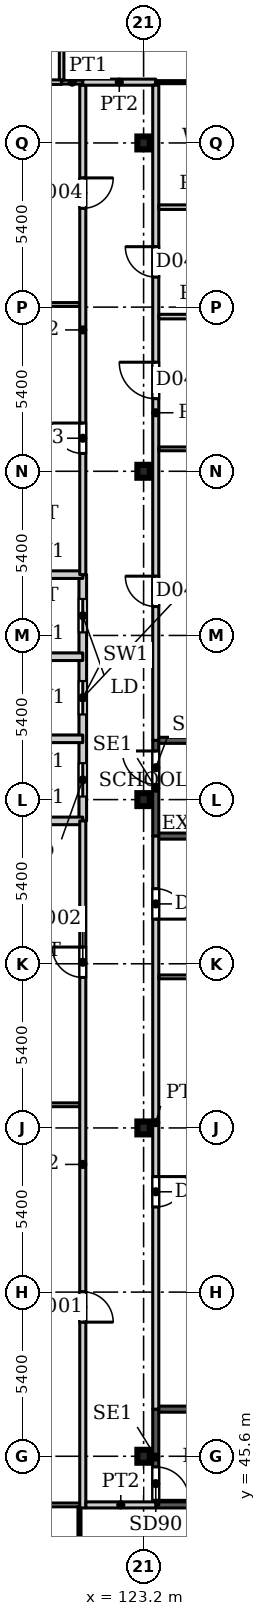
"""IFC4 building model, lengths in metres.
Left out: names, types, materials, properties, quantities, classifications, styles, units other than length and angle.
Written with IfcOpenShell. Run it as: python <this file> out.ifc"""

import sys

from ifc_helpers import new_model, si_unit, direction, frame, frame_2d, origin, origin_2d, place, context, subcontext, project, spatial, rectangle, i_section, extrude, source, transform, mapped, element, fill, save


model = new_model("IFC4")
c1 = context("Model", 3, precision=1e-05, world=origin(), true_north=direction((0.0, 1.0)))
c2 = subcontext(c1, "Body", "Model", "MODEL_VIEW")
j1 = project(units=[si_unit("LENGTHUNIT", "METRE"), si_unit("PLANEANGLEUNIT", "RADIAN")], contexts=[c1])
p1 = place(None, origin())
s1 = spatial("IfcSite", under=j1, at=p1, CompositionType="ELEMENT")
p2 = place(p1, origin())
s2 = spatial("IfcBuilding", under=s1, at=p2, CompositionType="ELEMENT")
p3 = place(p2, frame((0.0, 0.0, 21.5)))
s3 = spatial("IfcBuildingStorey", under=s2, at=p3, CompositionType="ELEMENT", Elevation=21.5)
for number, where, z_axis, x_axis in (
    (1, (123.2, 45.6, 0.0), (0.0, 0.0, 1.0), (1.0, 0.0, 0.0)),
    (2, (123.2, 56.4, 0.0), (0.0, 0.0, 1.0), (1.0, 0.0, 0.0)),
    (3, (123.2, 67.2, 0.0), (0.0, 0.0, 1.0), (1.0, 0.0, 0.0)),
    (4, (123.2, 78.0, 0.0), (0.0, 0.0, 1.0), (1.0, 0.0, 0.0)),
    (5, (123.2, 88.8, 0.0), (0.0, 0.0, 1.0), (1.0, 0.0, 0.0)),
):
    element("IfcColumn", number, at=place(p3, frame(where, z_axis=z_axis, x_axis=x_axis)), inside=s3, PredefinedType="COLUMN", context=c2, shape_type="SweptSolid", body=[
        extrude(i_section(OverallWidth=0.409, OverallDepth=0.425, WebThickness=0.033, FlangeThickness=0.052, FilletRadius=0.013, at=origin_2d()), origin(), (0.0, 0.0, 1.0), 4.5),
    ])
p4 = place(p3, frame((121.2, 66.5, 0.0), z_axis=(0.0, 0.0, 1.0), x_axis=(0.0, 1.0, 0.0)))
e6 = element("IfcWall", 6, at=p4, inside=s3, PredefinedType="PARTITIONING", context=c2, shape_type="SweptSolid", body=[
    extrude(rectangle(XDim=8.1, YDim=0.25, at=frame_2d((4.05, 0.0))), origin(), (0.0, 0.0, 1.0), 4.5),
])
p5 = place(p4, frame((0.8, 0.0, 0.0)))
e7 = element("IfcOpeningElement", 7, at=p5, cuts=e6, PredefinedType="OPENING", context=c2, shape_type="SweptSolid", body=[
    extrude(rectangle(XDim=1.1, YDim=2.2, at=frame_2d((0.55, 1.1))), frame((0.0, 0.135, 0.0), z_axis=(0.0, -1.0, 0.0), x_axis=(1.0, 0.0, 0.0)), (0.0, 0.0, 1.0), 0.27),
])
p6 = place(p4, frame((3.5, 0.0, 0.0)))
e8 = element("IfcOpeningElement", 8, at=p6, cuts=e6, PredefinedType="OPENING", context=c2, shape_type="SweptSolid", body=[
    extrude(rectangle(XDim=1.1, YDim=2.2, at=frame_2d((0.55, 1.1))), frame((0.0, 0.135, 0.0), z_axis=(0.0, -1.0, 0.0), x_axis=(1.0, 0.0, 0.0)), (0.0, 0.0, 1.0), 0.27),
])
p7 = place(p4, frame((6.2, 0.0, 0.0)))
e9 = element("IfcOpeningElement", 9, at=p7, cuts=e6, PredefinedType="OPENING", context=c2, shape_type="SweptSolid", body=[
    extrude(rectangle(XDim=1.1, YDim=2.2, at=frame_2d((0.55, 1.1))), frame((0.0, 0.135, 0.0), z_axis=(0.0, -1.0, 0.0), x_axis=(1.0, 0.0, 0.0)), (0.0, 0.0, 1.0), 0.27),
])
for number, where, z_axis, x_axis in (
    (10, (118.5, 66.5, 0.0), (0.0, 0.0, 1.0), (1.0, 0.0, 0.0)),
    (11, (118.5, 69.2, 0.0), (0.0, 0.0, 1.0), (1.0, 0.0, 0.0)),
    (12, (118.5, 71.9, 0.0), (0.0, 0.0, 1.0), (1.0, 0.0, 0.0)),
    (13, (118.5, 74.6, 0.0), (0.0, 0.0, 1.0), (1.0, 0.0, 0.0)),
):
    element("IfcWall", number, at=place(p3, frame(where, z_axis=z_axis, x_axis=x_axis)), inside=s3, PredefinedType="PARTITIONING", context=c2, shape_type="SweptSolid", body=[
        extrude(rectangle(XDim=2.7, YDim=0.25, at=frame_2d((1.35, 0.0))), origin(), (0.0, 0.0, 1.0), 4.5),
    ])
p8 = place(p3, frame((123.6, 44.0, 0.0), z_axis=(0.0, 0.0, 1.0), x_axis=(1.0, 0.0, 0.0)))
e14 = element("IfcWall", 14, at=p8, inside=s3, PredefinedType="SHEAR", context=c2, shape_type="SweptSolid", body=[
    extrude(rectangle(XDim=7.2, YDim=0.2, at=frame_2d((3.6, 0.0))), origin(), (0.0, 0.0, 1.0), 4.5),
])
p9 = place(p3, frame((123.6, 47.15, 0.0), z_axis=(0.0, 0.0, 1.0), x_axis=(1.0, 0.0, 0.0)))
e15 = element("IfcWall", 15, at=p9, inside=s3, PredefinedType="SHEAR", context=c2, shape_type="SweptSolid", body=[
    extrude(rectangle(XDim=8.4, YDim=0.2, at=frame_2d((4.2, 0.0))), origin(), (0.0, 0.0, 1.0), 4.5),
])
p10 = place(p3, frame((123.6, 44.0, 0.0), z_axis=(0.0, 0.0, 1.0), x_axis=(0.0, 1.0, 0.0)))
e16 = element("IfcWall", 16, at=p10, inside=s3, PredefinedType="SHEAR", context=c2, shape_type="SweptSolid", body=[
    extrude(rectangle(XDim=3.15, YDim=0.2, at=frame_2d((1.575, 0.0))), origin(), (0.0, 0.0, 1.0), 4.5),
])
p11 = place(p10, frame((0.15, 0.0, 0.0)))
e17 = element("IfcOpeningElement", 17, at=p11, cuts=e16, PredefinedType="OPENING", context=c2, shape_type="SweptSolid", body=[
    extrude(rectangle(XDim=1.1, YDim=2.2, at=frame_2d((0.55, 1.1))), frame((0.0, 0.11, 0.0), z_axis=(0.0, -1.0, 0.0), x_axis=(1.0, 0.0, 0.0)), (0.0, 0.0, 1.0), 0.22),
])
p12 = place(p3, frame((123.6, 66.0, 0.0), z_axis=(0.0, 0.0, 1.0), x_axis=(1.0, 0.0, 0.0)))
e18 = element("IfcWall", 18, at=p12, inside=s3, PredefinedType="SHEAR", context=c2, shape_type="SweptSolid", body=[
    extrude(rectangle(XDim=7.2, YDim=0.2, at=frame_2d((3.6, 0.0))), origin(), (0.0, 0.0, 1.0), 4.5),
])
p13 = place(p3, frame((123.6, 69.15, 0.0), z_axis=(0.0, 0.0, 1.0), x_axis=(1.0, 0.0, 0.0)))
e19 = element("IfcWall", 19, at=p13, inside=s3, PredefinedType="SHEAR", context=c2, shape_type="SweptSolid", body=[
    extrude(rectangle(XDim=8.4, YDim=0.2, at=frame_2d((4.2, 0.0))), origin(), (0.0, 0.0, 1.0), 4.5),
])
p14 = place(p3, frame((123.6, 66.0, 0.0), z_axis=(0.0, 0.0, 1.0), x_axis=(0.0, 1.0, 0.0)))
e20 = element("IfcWall", 20, at=p14, inside=s3, PredefinedType="SHEAR", context=c2, shape_type="SweptSolid", body=[
    extrude(rectangle(XDim=3.15, YDim=0.2, at=frame_2d((1.575, 0.0))), origin(), (0.0, 0.0, 1.0), 4.5),
])
p15 = place(p14, frame((1.7, 0.0, 0.0)))
e21 = element("IfcOpeningElement", 21, at=p15, cuts=e20, PredefinedType="OPENING", context=c2, shape_type="SweptSolid", body=[
    extrude(rectangle(XDim=1.1, YDim=2.2, at=frame_2d((0.55, 1.1))), frame((0.0, 0.11, 0.0), z_axis=(0.0, -1.0, 0.0), x_axis=(1.0, 0.0, 0.0)), (0.0, 0.0, 1.0), 0.22),
])
p16 = place(p3, frame((110.183, 90.8, 0.0), z_axis=(0.0, 0.0, 1.0), x_axis=(1.0, 0.0, 0.0)))
e22 = element("IfcWall", 22, at=p16, inside=s3, PredefinedType="PARTITIONING", context=c2, shape_type="SweptSolid", body=[
    extrude(rectangle(XDim=10.321, YDim=0.15, at=frame_2d((5.16, 0.0))), origin(), (0.0, 0.0, 1.0), 4.18),
])
p17 = place(p3, frame((112.862, 44.0, 0.0), z_axis=(0.0, 0.0, 1.0), x_axis=(1.0, 0.0, 0.0)))
e23 = element("IfcWall", 23, at=p17, inside=s3, PredefinedType="PARTITIONING", context=c2, shape_type="SweptSolid", body=[
    extrude(rectangle(XDim=8.279, YDim=0.125, at=frame_2d((4.14, 0.0))), origin(), (0.0, 0.0, 1.0), 4.18),
])
for number, where, z_axis, x_axis in (
    (24, (112.862, 57.162, 0.0), (0.0, 0.0, 1.0), (1.0, 0.0, 0.0)),
    (25, (112.862, 83.487, 0.0), (0.0, 0.0, 1.0), (1.0, 0.0, 0.0)),
):
    element("IfcWall", number, at=place(p3, frame(where, z_axis=z_axis, x_axis=x_axis)), inside=s3, PredefinedType="PARTITIONING", context=c2, shape_type="SweptSolid", body=[
        extrude(rectangle(XDim=8.238, YDim=0.125, at=frame_2d((4.119, 0.0))), origin(), (0.0, 0.0, 1.0), 4.18),
    ])
p18 = place(p3, frame((120.504, 90.8, 0.0), z_axis=(0.0, 0.0, 1.0), x_axis=(1.0, 0.0, 0.0)))
e26 = element("IfcWall", 26, at=p18, inside=s3, PredefinedType="PARTITIONING", context=c2, shape_type="SweptSolid", body=[
    extrude(rectangle(XDim=0.696, YDim=0.125, at=frame_2d((0.348, 0.0))), origin(), (0.0, 0.0, 1.0), 4.18),
])
p19 = place(p3, frame((120.504, 90.875, 0.0), z_axis=(0.0, 0.0, 1.0), x_axis=(0.0, 1.0, 0.0)))
e27 = element("IfcWall", 27, at=p19, inside=s3, PredefinedType="PARTITIONING", context=c2, shape_type="SweptSolid", body=[
    extrude(rectangle(XDim=8.225, YDim=0.15, at=frame_2d((4.113, 0.0))), origin(), (0.0, 0.0, 1.0), 4.18),
])
p20 = place(p3, frame((121.091, 35.3, 0.0), z_axis=(0.0, 0.0, 1.0), x_axis=(0.0, 1.0, 0.0)))
e28 = element("IfcWall", 28, at=p20, inside=s3, PredefinedType="PARTITIONING", context=c2, shape_type="SweptSolid", body=[
    extrude(rectangle(XDim=8.638, YDim=0.1, at=frame_2d((4.319, 0.0))), origin(), (0.0, 0.0, 1.0), 4.18),
])
p21 = place(p3, frame((121.2, 43.9, 0.0), z_axis=(0.0, 0.0, 1.0), x_axis=(0.0, 1.0, 0.0)))
e29 = element("IfcWall", 29, at=p21, inside=s3, PredefinedType="PARTITIONING", context=c2, shape_type="SweptSolid", body=[
    extrude(rectangle(XDim=22.6, YDim=0.2, at=frame_2d((11.3, 0.0))), origin(), (0.0, 0.0, 1.0), 4.18),
])
p22 = place(p21, frame((6.112, 0.0, 0.0)))
e30 = element("IfcOpeningElement", 30, at=p22, cuts=e29, PredefinedType="OPENING", context=c2, shape_type="SweptSolid", body=[
    extrude(rectangle(XDim=1.0, YDim=2.1, at=frame_2d((0.5, 1.05))), frame((0.0, 0.11, 0.0), z_axis=(0.0, -1.0, 0.0), x_axis=(1.0, 0.0, 0.0)), (0.0, 0.0, 1.0), 0.22),
])
p23 = place(p21, frame((17.45, 0.0, 0.0)))
e31 = element("IfcOpeningElement", 31, at=p23, cuts=e29, PredefinedType="OPENING", context=c2, shape_type="SweptSolid", body=[
    extrude(rectangle(XDim=1.0, YDim=2.1, at=frame_2d((0.5, 1.05))), frame((0.0, 0.11, 0.0), z_axis=(0.0, -1.0, 0.0), x_axis=(1.0, 0.0, 0.0)), (0.0, 0.0, 1.0), 0.22),
])
p24 = place(p3, frame((121.2, 74.6, 0.0), z_axis=(0.0, 0.0, 1.0), x_axis=(0.0, 1.0, 0.0)))
e32 = element("IfcWall", 32, at=p24, inside=s3, PredefinedType="PARTITIONING", context=c2, shape_type="SweptSolid", body=[
    extrude(rectangle(XDim=16.1, YDim=0.2, at=frame_2d((8.05, 0.0))), origin(), (0.0, 0.0, 1.0), 4.18),
])
p25 = place(p24, frame((3.987, 0.0, 0.0)))
e33 = element("IfcOpeningElement", 33, at=p25, cuts=e32, PredefinedType="OPENING", context=c2, shape_type="SweptSolid", body=[
    extrude(rectangle(XDim=1.0, YDim=2.1, at=frame_2d((0.5, 1.05))), frame((0.0, 0.11, 0.0), z_axis=(0.0, -1.0, 0.0), x_axis=(1.0, 0.0, 0.0)), (0.0, 0.0, 1.0), 0.22),
])
p26 = place(p24, frame((12.05, 0.0, 0.0)))
e34 = element("IfcOpeningElement", 34, at=p26, cuts=e32, PredefinedType="OPENING", context=c2, shape_type="SweptSolid", body=[
    extrude(rectangle(XDim=1.0, YDim=2.1, at=frame_2d((0.5, 1.05))), frame((0.0, 0.11, 0.0), z_axis=(0.0, -1.0, 0.0), x_axis=(1.0, 0.0, 0.0)), (0.0, 0.0, 1.0), 0.22),
])
p27 = place(p3, frame((121.2, 90.8, 0.0), z_axis=(0.0, 0.0, 1.0), x_axis=(1.0, 0.0, 0.0)))
e35 = element("IfcWall", 35, at=p27, inside=s3, PredefinedType="PARTITIONING", context=c2, shape_type="SweptSolid", body=[
    extrude(rectangle(XDim=2.4, YDim=0.2, at=frame_2d((1.2, 0.0))), origin(), (0.0, 0.0, 1.0), 4.18),
])
p28 = place(p3, frame((121.3, 44.0, 0.0), z_axis=(0.0, 0.0, 1.0), x_axis=(1.0, 0.0, 0.0)))
e36 = element("IfcWall", 36, at=p28, inside=s3, PredefinedType="PARTITIONING", context=c2, shape_type="SweptSolid", body=[
    extrude(rectangle(XDim=2.3, YDim=0.2, at=frame_2d((1.15, 0.0))), origin(), (0.0, 0.0, 1.0), 4.18),
])
p29 = place(p3, frame((123.6, 47.15, 0.0), z_axis=(0.0, 0.0, 1.0), x_axis=(0.0, 1.0, 0.0)))
e37 = element("IfcWall", 37, at=p29, inside=s3, PredefinedType="PARTITIONING", context=c2, shape_type="SweptSolid", body=[
    extrude(rectangle(XDim=18.85, YDim=0.2, at=frame_2d((9.425, 0.0))), origin(), (0.0, 0.0, 1.0), 4.18),
])
p30 = place(p29, frame((6.65, 0.0, 0.0)))
e38 = element("IfcOpeningElement", 38, at=p30, cuts=e37, PredefinedType="OPENING", context=c2, shape_type="SweptSolid", body=[
    extrude(rectangle(XDim=1.0, YDim=2.1, at=frame_2d((0.5, 1.05))), frame((0.0, 0.11, 0.0), z_axis=(0.0, -1.0, 0.0), x_axis=(1.0, 0.0, 0.0)), (0.0, 0.0, 1.0), 0.22),
])
p31 = place(p29, frame((16.119, 0.0, 0.0)))
e39 = element("IfcOpeningElement", 39, at=p31, cuts=e37, PredefinedType="OPENING", context=c2, shape_type="SweptSolid", body=[
    extrude(rectangle(XDim=1.0, YDim=2.1, at=frame_2d((0.5, 1.05))), frame((0.0, 0.11, 0.0), z_axis=(0.0, -1.0, 0.0), x_axis=(1.0, 0.0, 0.0)), (0.0, 0.0, 1.0), 0.22),
])
p32 = place(p3, frame((123.6, 69.15, 0.0), z_axis=(0.0, 0.0, 1.0), x_axis=(0.0, 1.0, 0.0)))
e40 = element("IfcWall", 40, at=p32, inside=s3, PredefinedType="PARTITIONING", context=c2, shape_type="SweptSolid", body=[
    extrude(rectangle(XDim=21.55, YDim=0.2, at=frame_2d((10.775, 0.0))), origin(), (0.0, 0.0, 1.0), 4.18),
])
p33 = place(p32, frame((4.4, 0.0, 0.0)))
e41 = element("IfcOpeningElement", 41, at=p33, cuts=e40, PredefinedType="OPENING", context=c2, shape_type="SweptSolid", body=[
    extrude(rectangle(XDim=1.0, YDim=2.1, at=frame_2d((0.5, 1.05))), frame((0.0, 0.11, 0.0), z_axis=(0.0, -1.0, 0.0), x_axis=(1.0, 0.0, 0.0)), (0.0, 0.0, 1.0), 0.22),
])
p34 = place(p32, frame((15.238, 0.0, 0.0)))
e42 = element("IfcOpeningElement", 42, at=p34, cuts=e40, PredefinedType="OPENING", context=c2, shape_type="SweptSolid", body=[
    extrude(rectangle(XDim=1.0, YDim=2.1, at=frame_2d((0.5, 1.05))), frame((0.0, 0.11, 0.0), z_axis=(0.0, -1.0, 0.0), x_axis=(1.0, 0.0, 0.0)), (0.0, 0.0, 1.0), 0.22),
])
p35 = place(p32, frame((11.238, 0.0, 0.0)))
e43 = element("IfcOpeningElement", 43, at=p35, cuts=e40, PredefinedType="OPENING", context=c2, shape_type="SweptSolid", body=[
    extrude(rectangle(XDim=1.2, YDim=2.1, at=frame_2d((0.6, 1.05))), frame((0.0, 0.11, 0.0), z_axis=(0.0, -1.0, 0.0), x_axis=(1.0, 0.0, 0.0)), (0.0, 0.0, 1.0), 0.22),
])
p36 = place(p3, frame((123.6, 90.8, 0.0), z_axis=(0.0, 0.0, 1.0), x_axis=(1.0, 0.0, 0.0)))
e44 = element("IfcWall", 44, at=p36, inside=s3, PredefinedType="PARTITIONING", context=c2, shape_type="SweptSolid", body=[
    extrude(rectangle(XDim=8.4, YDim=0.1, at=frame_2d((4.2, 0.0))), origin(), (0.0, 0.0, 1.0), 4.18),
])
for number, where, z_axis, x_axis in (
    (45, (123.7, 61.369, 0.0), (0.0, 0.0, 1.0), (1.0, 0.0, 0.0)),
    (46, (123.7, 78.738, 0.0), (0.0, 0.0, 1.0), (1.0, 0.0, 0.0)),
):
    element("IfcWall", number, at=place(p3, frame(where, z_axis=z_axis, x_axis=x_axis)), inside=s3, PredefinedType="PARTITIONING", context=c2, shape_type="SweptSolid", body=[
        extrude(rectangle(XDim=8.3, YDim=0.125, at=frame_2d((4.15, 0.0))), origin(), (0.0, 0.0, 1.0), 4.18),
    ])
for number, where, z_axis, x_axis in (
    (47, (123.7, 83.088, 0.0), (0.0, 0.0, 1.0), (1.0, 0.0, 0.0)),
    (48, (123.7, 86.688, 0.0), (0.0, 0.0, 1.0), (1.0, 0.0, 0.0)),
):
    element("IfcWall", number, at=place(p3, frame(where, z_axis=z_axis, x_axis=x_axis)), inside=s3, PredefinedType="PARTITIONING", context=c2, shape_type="SweptSolid", body=[
        extrude(rectangle(XDim=3.025, YDim=0.15, at=frame_2d((1.513, 0.0))), origin(), (0.0, 0.0, 1.0), 4.18),
    ])
m1 = source(origin(), c2, "Body", "SweptSolid", [
    extrude(rectangle(XDim=1.1, YDim=2.2, at=frame_2d((0.55, 1.1))), frame((0.0, 0.025, 0.0), z_axis=(0.0, -1.0, 0.0), x_axis=(1.0, 0.0, 0.0)), (0.0, 0.0, 1.0), 0.05),
])
p37 = place(p5, origin())
e49 = element("IfcDoor", 49, at=p37, inside=s3, OperationType="SLIDING_TO_LEFT", PredefinedType="DOOR", context=c2, shape_type="MappedRepresentation", body=[
    mapped(m1, transform((0.0, 0.0, 0.0), x_axis=(1.0, 0.0, 0.0), y_axis=(0.0, 1.0, 0.0), z_axis=(0.0, 0.0, 1.0), scale=1.0)),
])
fill(e7, e49)
p38 = place(p6, origin())
e50 = element("IfcDoor", 50, at=p38, inside=s3, OperationType="SLIDING_TO_LEFT", PredefinedType="DOOR", context=c2, shape_type="MappedRepresentation", body=[
    mapped(m1, transform((0.0, 0.0, 0.0), x_axis=(1.0, 0.0, 0.0), y_axis=(0.0, 1.0, 0.0), z_axis=(0.0, 0.0, 1.0), scale=1.0)),
])
fill(e8, e50)
p39 = place(p7, origin())
e51 = element("IfcDoor", 51, at=p39, inside=s3, OperationType="SLIDING_TO_LEFT", PredefinedType="DOOR", context=c2, shape_type="MappedRepresentation", body=[
    mapped(m1, transform((0.0, 0.0, 0.0), x_axis=(1.0, 0.0, 0.0), y_axis=(0.0, 1.0, 0.0), z_axis=(0.0, 0.0, 1.0), scale=1.0)),
])
fill(e9, e51)
m2 = source(origin(), c2, "Body", "SweptSolid", [
    extrude(rectangle(XDim=1.1, YDim=2.2, at=frame_2d((0.55, 1.1))), frame((0.0, 0.025, 0.0), z_axis=(0.0, -1.0, 0.0), x_axis=(1.0, 0.0, 0.0)), (0.0, 0.0, 1.0), 0.05),
])
p40 = place(p11, origin())
e52 = element("IfcDoor", 52, at=p40, inside=s3, OperationType="SINGLE_SWING_RIGHT", PredefinedType="DOOR", context=c2, shape_type="MappedRepresentation", body=[
    mapped(m2, transform((0.0, 0.0, 0.0), x_axis=(1.0, 0.0, 0.0), y_axis=(0.0, 1.0, 0.0), z_axis=(0.0, 0.0, 1.0), scale=1.0)),
])
fill(e17, e52)
p41 = place(p15, origin())
e53 = element("IfcDoor", 53, at=p41, inside=s3, OperationType="SINGLE_SWING_LEFT", PredefinedType="DOOR", context=c2, shape_type="MappedRepresentation", body=[
    mapped(m2, transform((0.0, 0.0, 0.0), x_axis=(1.0, 0.0, 0.0), y_axis=(0.0, 1.0, 0.0), z_axis=(0.0, 0.0, 1.0), scale=1.0)),
])
fill(e21, e53)
m3 = source(origin(), c2, "Body", "SweptSolid", [
    extrude(rectangle(XDim=1.0, YDim=2.1, at=frame_2d((0.5, 1.05))), frame((0.0, 0.025, 0.0), z_axis=(0.0, -1.0, 0.0), x_axis=(1.0, 0.0, 0.0)), (0.0, 0.0, 1.0), 0.05),
])
p42 = place(p22, origin())
e54 = element("IfcDoor", 54, at=p42, inside=s3, OperationType="SINGLE_SWING_RIGHT", PredefinedType="DOOR", context=c2, shape_type="MappedRepresentation", body=[
    mapped(m3, transform((0.0, 0.0, 0.0), x_axis=(1.0, 0.0, 0.0), y_axis=(0.0, 1.0, 0.0), z_axis=(0.0, 0.0, 1.0), scale=1.0)),
])
fill(e30, e54)
p43 = place(p23, origin())
e55 = element("IfcDoor", 55, at=p43, inside=s3, OperationType="SINGLE_SWING_LEFT", PredefinedType="DOOR", context=c2, shape_type="MappedRepresentation", body=[
    mapped(m3, transform((0.0, 0.0, 0.0), x_axis=(1.0, 0.0, 0.0), y_axis=(0.0, 1.0, 0.0), z_axis=(0.0, 0.0, 1.0), scale=1.0)),
])
fill(e31, e55)
p44 = place(p25, origin())
e56 = element("IfcDoor", 56, at=p44, inside=s3, OperationType="SINGLE_SWING_LEFT", PredefinedType="DOOR", context=c2, shape_type="MappedRepresentation", body=[
    mapped(m3, transform((0.0, 0.0, 0.0), x_axis=(1.0, 0.0, 0.0), y_axis=(0.0, 1.0, 0.0), z_axis=(0.0, 0.0, 1.0), scale=1.0)),
])
fill(e33, e56)
p45 = place(p26, origin())
e57 = element("IfcDoor", 57, at=p45, inside=s3, OperationType="SINGLE_SWING_RIGHT", PredefinedType="DOOR", context=c2, shape_type="MappedRepresentation", body=[
    mapped(m3, transform((0.0, 0.0, 0.0), x_axis=(1.0, 0.0, 0.0), y_axis=(0.0, 1.0, 0.0), z_axis=(0.0, 0.0, 1.0), scale=1.0)),
])
fill(e34, e57)
p46 = place(p30, origin())
e58 = element("IfcDoor", 58, at=p46, inside=s3, OperationType="SINGLE_SWING_RIGHT", PredefinedType="DOOR", context=c2, shape_type="MappedRepresentation", body=[
    mapped(m3, transform((0.0, 0.0, 0.0), x_axis=(1.0, 0.0, 0.0), y_axis=(0.0, 1.0, 0.0), z_axis=(0.0, 0.0, 1.0), scale=1.0)),
])
fill(e38, e58)
p47 = place(p31, origin())
e59 = element("IfcDoor", 59, at=p47, inside=s3, OperationType="SINGLE_SWING_RIGHT", PredefinedType="DOOR", context=c2, shape_type="MappedRepresentation", body=[
    mapped(m3, transform((0.0, 0.0, 0.0), x_axis=(1.0, 0.0, 0.0), y_axis=(0.0, 1.0, 0.0), z_axis=(0.0, 0.0, 1.0), scale=1.0)),
])
fill(e39, e59)
p48 = place(p33, origin())
e60 = element("IfcDoor", 60, at=p48, inside=s3, OperationType="SINGLE_SWING_LEFT", PredefinedType="DOOR", context=c2, shape_type="MappedRepresentation", body=[
    mapped(m3, transform((0.0, 0.0, 0.0), x_axis=(1.0, 0.0, 0.0), y_axis=(0.0, 1.0, 0.0), z_axis=(0.0, 0.0, 1.0), scale=1.0)),
])
fill(e41, e60)
p49 = place(p34, origin())
e61 = element("IfcDoor", 61, at=p49, inside=s3, OperationType="SINGLE_SWING_LEFT", PredefinedType="DOOR", context=c2, shape_type="MappedRepresentation", body=[
    mapped(m3, transform((0.0, 0.0, 0.0), x_axis=(1.0, 0.0, 0.0), y_axis=(0.0, 1.0, 0.0), z_axis=(0.0, 0.0, 1.0), scale=1.0)),
])
fill(e42, e61)
m4 = source(origin(), c2, "Body", "SweptSolid", [
    extrude(rectangle(XDim=1.2, YDim=2.1, at=frame_2d((0.6, 1.05))), frame((0.0, 0.025, 0.0), z_axis=(0.0, -1.0, 0.0), x_axis=(1.0, 0.0, 0.0)), (0.0, 0.0, 1.0), 0.05),
])
p50 = place(p35, origin())
e62 = element("IfcDoor", 62, at=p50, inside=s3, OperationType="SINGLE_SWING_LEFT", PredefinedType="DOOR", context=c2, shape_type="MappedRepresentation", body=[
    mapped(m4, transform((0.0, 0.0, 0.0), x_axis=(1.0, 0.0, 0.0), y_axis=(0.0, 1.0, 0.0), z_axis=(0.0, 0.0, 1.0), scale=1.0)),
])
fill(e43, e62)
save(model, sys.argv[1])
